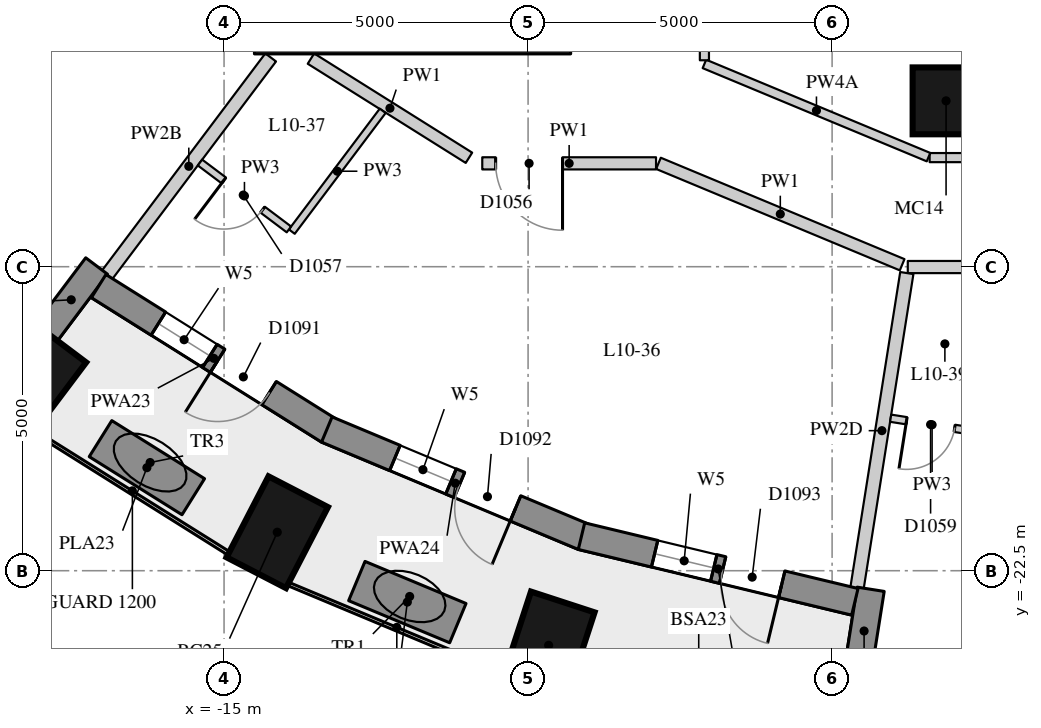
"""IFC4 building model, lengths in metres.
Left out: names, types, materials, properties, quantities, classifications, styles, units other than length and angle.
Written with IfcOpenShell. Run it as: python <this file> out.ifc"""

import sys

from ifc_helpers import new_model, si_unit, direction, frame, frame_2d, origin, origin_2d, place, context, subcontext, project, spatial, rectangle, extrude, element, fill, save


model = new_model("IFC4")
c1 = context("Model", 3, precision=1e-05, world=origin(), true_north=direction((0.0, 1.0)))
c2 = subcontext(c1, "Body", "Model", "MODEL_VIEW")
j1 = project(units=[si_unit("LENGTHUNIT", "METRE"), si_unit("PLANEANGLEUNIT", "RADIAN")], contexts=[c1])
p1 = place(None, origin())
s1 = spatial("IfcSite", under=j1, at=p1, CompositionType="ELEMENT")
p2 = place(p1, origin())
s2 = spatial("IfcBuilding", under=s1, at=p2, CompositionType="ELEMENT")
p3 = place(p2, frame((0.0, 0.0, 41.5)))
s3 = spatial("IfcBuildingStorey", under=s2, at=p3, CompositionType="ELEMENT", Elevation=41.5)
for number, where, z_axis, x_axis in (
    (1, (-18.159, -19.343, 0.0), (0.0, 0.0, 1.0), (-0.601, -0.799, 0.0)),
    (2, (-14.125, -21.867, 0.0), (0.0, 0.0, 1.0), (-0.46, -0.888, 0.0)),
    (3, (-9.662, -23.727, 0.0), (0.0, 0.0, 1.0), (-0.31, -0.951, 0.0)),
):
    element("IfcColumn", number, at=place(p3, frame(where, z_axis=z_axis, x_axis=x_axis)), inside=s3, PredefinedType="COLUMN", context=c2, shape_type="SweptSolid", body=[
        extrude(rectangle(XDim=1.5, YDim=1.1, at=origin_2d()), origin(), (0.0, 0.0, 1.0), 3.3),
    ])
p4 = place(p3, frame((-3.126, -14.772, 0.0), z_axis=(0.0, 0.0, 1.0), x_axis=(1.0, 0.0, 0.0)))
e4 = element("IfcColumn", 4, at=p4, inside=s3, PredefinedType="COLUMN", context=c2, shape_type="SweptSolid", body=[
    extrude(rectangle(XDim=1.1, YDim=1.1, at=origin_2d()), origin(), (0.0, 0.0, 1.0), 3.3),
])
p5 = place(p3, frame((-17.932, -18.6, 0.0), z_axis=(0.0, 0.0, 1.0), x_axis=(0.601262851241, 0.799051302306, 0.0)))
e5 = element("IfcWall", 5, at=p5, inside=s3, PredefinedType="SOLIDWALL", context=c2, shape_type="SweptSolid", body=[
    extrude(rectangle(XDim=1.391, YDim=0.45, at=frame_2d((0.696, 0.0))), origin(), (0.0, 0.0, 1.0), 2.57),
])
p6 = place(p3, frame((-4.583, -24.178, 0.0), z_axis=(0.0, 0.0, 1.0), x_axis=(0.156133927791, 0.98773589415, 0.0)))
e6 = element("IfcWall", 6, at=p6, inside=s3, PredefinedType="SOLIDWALL", context=c2, shape_type="SweptSolid", body=[
    extrude(rectangle(XDim=1.39, YDim=0.45, at=frame_2d((0.695, 0.0))), origin(), (0.0, 0.0, 1.0), 2.47),
])
p7 = place(p3, frame((-17.062, -17.819, 0.0), z_axis=(0.0, 0.0, 1.0), x_axis=(0.846990101364, -0.531608660757, 0.0)))
e7 = element("IfcWall", 7, at=p7, inside=s3, PredefinedType="SOLIDWALL", context=c2, shape_type="SweptSolid", body=[
    extrude(rectangle(XDim=4.469, YDim=0.45, at=frame_2d((2.234, 0.0))), origin(), (0.0, 0.0, 1.0), 3.02),
])
p8 = place(p7, frame((1.159, 0.0, 0.4)))
e8 = element("IfcOpeningElement", 8, at=p8, cuts=e7, PredefinedType="OPENING", context=c2, shape_type="SweptSolid", body=[
    extrude(rectangle(XDim=1.0, YDim=1.75, at=frame_2d((0.5, 0.875))), frame((0.0, 0.235, 0.0), z_axis=(0.0, -1.0, 0.0), x_axis=(1.0, 0.0, 0.0)), (0.0, 0.0, 1.0), 0.47),
])
p9 = place(p7, frame((2.31, 0.0, 0.0)))
e9 = element("IfcOpeningElement", 9, at=p9, cuts=e7, PredefinedType="OPENING", context=c2, shape_type="SweptSolid", body=[
    extrude(rectangle(XDim=1.0, YDim=2.15, at=frame_2d((0.5, 1.075))), frame((0.0, 0.235, 0.0), z_axis=(0.0, -1.0, 0.0), x_axis=(1.0, 0.0, 0.0)), (0.0, 0.0, 1.0), 0.47),
])
p10 = place(p3, frame((-13.31, -20.178, 0.0), z_axis=(0.0, 0.0, 1.0), x_axis=(0.922634412489, -0.385675693935, 0.0)))
e10 = element("IfcWall", 10, at=p10, inside=s3, PredefinedType="SOLIDWALL", context=c2, shape_type="SweptSolid", body=[
    extrude(rectangle(XDim=4.577, YDim=0.45, at=frame_2d((2.288, 0.0))), origin(), (0.0, 0.0, 1.0), 3.02),
])
p11 = place(p10, frame((1.213, 0.0, 0.4)))
e11 = element("IfcOpeningElement", 11, at=p11, cuts=e10, PredefinedType="OPENING", context=c2, shape_type="SweptSolid", body=[
    extrude(rectangle(XDim=1.0, YDim=1.75, at=frame_2d((0.5, 0.875))), frame((0.0, 0.235, 0.0), z_axis=(0.0, -1.0, 0.0), x_axis=(1.0, 0.0, 0.0)), (0.0, 0.0, 1.0), 0.47),
])
p12 = place(p10, frame((2.363, 0.0, 0.0)))
e12 = element("IfcOpeningElement", 12, at=p12, cuts=e10, PredefinedType="OPENING", context=c2, shape_type="SweptSolid", body=[
    extrude(rectangle(XDim=1.0, YDim=2.15, at=frame_2d((0.5, 1.075))), frame((0.0, 0.235, 0.0), z_axis=(0.0, -1.0, 0.0), x_axis=(1.0, 0.0, 0.0)), (0.0, 0.0, 1.0), 0.47),
])
p13 = place(p3, frame((-9.122, -21.932, 0.0), z_axis=(0.0, 0.0, 1.0), x_axis=(0.972346547441, -0.233542697764, 0.0)))
e13 = element("IfcWall", 13, at=p13, inside=s3, PredefinedType="SOLIDWALL", context=c2, shape_type="SweptSolid", body=[
    extrude(rectangle(XDim=4.624, YDim=0.45, at=frame_2d((2.312, 0.0))), origin(), (0.0, 0.0, 1.0), 3.02),
])
p14 = place(p13, frame((1.237, 0.0, 0.4)))
e14 = element("IfcOpeningElement", 14, at=p14, cuts=e13, PredefinedType="OPENING", context=c2, shape_type="SweptSolid", body=[
    extrude(rectangle(XDim=1.0, YDim=1.75, at=frame_2d((0.5, 0.875))), frame((0.0, 0.235, 0.0), z_axis=(0.0, -1.0, 0.0), x_axis=(1.0, 0.0, 0.0)), (0.0, 0.0, 1.0), 0.47),
])
p15 = place(p13, frame((2.387, 0.0, 0.0)))
e15 = element("IfcOpeningElement", 15, at=p15, cuts=e13, PredefinedType="OPENING", context=c2, shape_type="SweptSolid", body=[
    extrude(rectangle(XDim=1.0, YDim=2.15, at=frame_2d((0.5, 1.075))), frame((0.0, 0.235, 0.0), z_axis=(0.0, -1.0, 0.0), x_axis=(1.0, 0.0, 0.0)), (0.0, 0.0, 1.0), 0.47),
])
p16 = place(p3, frame((-17.032, -20.328, 0.0), z_axis=(0.0, 0.0, 1.0), x_axis=(0.847609446823, -0.530620604252, 0.0)))
e16 = element("IfcWall", 16, at=p16, inside=s3, PredefinedType="USERDEFINED", context=c2, shape_type="SweptSolid", body=[
    extrude(rectangle(XDim=1.8, YDim=0.7, at=frame_2d((0.9, 0.0))), origin(), (0.0, 0.0, 1.0), 0.75),
])
p17 = place(p3, frame((-12.817, -22.67, 0.0), z_axis=(0.0, 0.0, 1.0), x_axis=(0.923000660042, -0.384798364811, 0.0)))
e17 = element("IfcWall", 17, at=p17, inside=s3, PredefinedType="USERDEFINED", context=c2, shape_type="SweptSolid", body=[
    extrude(rectangle(XDim=1.8, YDim=0.7, at=frame_2d((0.9, 0.0))), origin(), (0.0, 0.0, 1.0), 0.75),
])
p18 = place(p3, frame((-14.5, -13.875, -0.28), z_axis=(0.0, 0.0, 1.0), x_axis=(1.0, 0.0, 0.0)))
e18 = element("IfcWall", 18, at=p18, inside=s3, PredefinedType="SHEAR", context=c2, shape_type="SweptSolid", body=[
    extrude(rectangle(XDim=5.2, YDim=0.25, at=frame_2d((2.6, 0.0))), origin(), (0.0, 0.0, 1.0), 3.3),
])
p19 = place(p3, frame((3.715, -17.506, 0.0), z_axis=(0.0, 0.0, 1.0), x_axis=(-1.0, 0.0, 0.0)))
e19 = element("IfcWall", 19, at=p19, inside=s3, PredefinedType="PARTITIONING", context=c2, shape_type="SweptSolid", body=[
    extrude(rectangle(XDim=7.471, YDim=0.2, at=frame_2d((3.735, 0.0))), origin(), (0.0, 0.0, 1.0), 3.02),
])
p20 = place(p19, frame((4.538, 0.0, 0.0)))
e20 = element("IfcOpeningElement", 20, at=p20, cuts=e19, PredefinedType="OPENING", context=c2, shape_type="SweptSolid", body=[
    extrude(rectangle(XDim=1.0, YDim=2.1, at=frame_2d((0.5, 1.05))), frame((0.0, 0.11, 0.0), z_axis=(0.0, -1.0, 0.0), x_axis=(1.0, 0.0, 0.0)), (0.0, 0.0, 1.0), 0.22),
])
p21 = place(p19, frame((0.743, 0.0, 0.0)))
e21 = element("IfcOpeningElement", 21, at=p21, cuts=e19, PredefinedType="OPENING", context=c2, shape_type="SweptSolid", body=[
    extrude(rectangle(XDim=1.0, YDim=2.1, at=frame_2d((0.5, 1.05))), frame((0.0, 0.11, 0.0), z_axis=(0.0, -1.0, 0.0), x_axis=(1.0, 0.0, 0.0)), (0.0, 0.0, 1.0), 0.22),
])
p22 = place(p3, frame((-3.848, -17.468, 0.0), z_axis=(0.0, 0.0, 1.0), x_axis=(-0.923248226412, 0.384203998454, 0.0)))
e22 = element("IfcWall", 22, at=p22, inside=s3, PredefinedType="PARTITIONING", context=c2, shape_type="SweptSolid", body=[
    extrude(rectangle(XDim=4.341, YDim=0.2, at=frame_2d((2.17, 0.0))), origin(), (0.0, 0.0, 1.0), 3.02),
])
p23 = place(p3, frame((-7.896, -15.8, 0.0), z_axis=(0.0, 0.0, 1.0), x_axis=(-1.0, 0.0, 0.0)))
e23 = element("IfcWall", 23, at=p23, inside=s3, PredefinedType="PARTITIONING", context=c2, shape_type="SweptSolid", body=[
    extrude(rectangle(XDim=2.858, YDim=0.2, at=frame_2d((1.429, 0.0))), origin(), (0.0, 0.0, 1.0), 3.02),
])
p24 = place(p23, frame((1.538, 0.0, 0.0)))
e24 = element("IfcOpeningElement", 24, at=p24, cuts=e23, PredefinedType="OPENING", context=c2, shape_type="SweptSolid", body=[
    extrude(rectangle(XDim=1.1, YDim=2.1, at=frame_2d((0.55, 1.05))), frame((0.0, 0.11, 0.0), z_axis=(0.0, -1.0, 0.0), x_axis=(1.0, 0.0, 0.0)), (0.0, 0.0, 1.0), 0.22),
])
p25 = place(p3, frame((-10.972, -15.708, 0.0), z_axis=(0.0, 0.0, 1.0), x_axis=(-0.846954991261, 0.53166459613, 0.0)))
e25 = element("IfcWall", 25, at=p25, inside=s3, PredefinedType="PARTITIONING", context=c2, shape_type="SweptSolid", body=[
    extrude(rectangle(XDim=3.068, YDim=0.2, at=frame_2d((1.534, 0.0))), origin(), (0.0, 0.0, 1.0), 3.02),
])
p26 = place(p3, frame((0.92, -15.706, 0.0), z_axis=(0.0, 0.0, 1.0), x_axis=(-1.0, 0.0, 0.0)))
e26 = element("IfcWall", 26, at=p26, inside=s3, PredefinedType="PARTITIONING", context=c2, shape_type="SweptSolid", body=[
    extrude(rectangle(XDim=4.316, YDim=0.15, at=frame_2d((2.158, 0.0))), origin(), (0.0, 0.0, 1.0), 3.02),
])
p27 = place(p3, frame((-3.415, -15.698, 0.0), z_axis=(0.0, 0.0, 1.0), x_axis=(-0.923293917367, 0.38409418396, 0.0)))
e27 = element("IfcWall", 27, at=p27, inside=s3, PredefinedType="PARTITIONING", context=c2, shape_type="SweptSolid", body=[
    extrude(rectangle(XDim=3.992, YDim=0.15, at=frame_2d((1.996, 0.0))), origin(), (0.0, 0.0, 1.0), 2.57),
])
p28 = place(p3, frame((-7.1, -14.105, 0.0), z_axis=(0.0, 0.0, 1.0), x_axis=(0.0, 1.0, 0.0)))
e28 = element("IfcWall", 28, at=p28, inside=s3, PredefinedType="PARTITIONING", context=c2, shape_type="SweptSolid", body=[
    extrude(rectangle(XDim=2.355, YDim=0.15, at=frame_2d((1.177, 0.0))), origin(), (0.0, 0.0, 1.0), 3.02),
])
p29 = place(p3, frame((-16.927, -17.638, 0.0), z_axis=(0.0, 0.0, 1.0), x_axis=(0.601158965663, 0.799129462605, 0.0)))
e29 = element("IfcWall", 29, at=p29, inside=s3, PredefinedType="PARTITIONING", context=c2, shape_type="SweptSolid", body=[
    extrude(rectangle(XDim=4.48, YDim=0.22, at=frame_2d((2.24, 0.0))), origin(), (0.0, 0.0, 1.0), 2.57),
])
p30 = place(p3, frame((-4.591, -22.789, 0.0), z_axis=(0.0, 0.0, 1.0), x_axis=(0.156110671429, 0.987739570062, 0.0)))
e30 = element("IfcWall", 30, at=p30, inside=s3, PredefinedType="PARTITIONING", context=c2, shape_type="SweptSolid", body=[
    extrude(rectangle(XDim=5.249, YDim=0.22, at=frame_2d((2.624, 0.0))), origin(), (0.0, 0.0, 1.0), 2.47),
])
p31 = place(p3, frame((-12.391, -14.936, 0.0), z_axis=(0.0, 0.0, 1.0), x_axis=(-0.601209195786, -0.799091673654, 0.0)))
e31 = element("IfcWall", 31, at=p31, inside=s3, PredefinedType="PARTITIONING", context=c2, shape_type="SweptSolid", body=[
    extrude(rectangle(XDim=2.486, YDim=0.12, at=frame_2d((1.243, 0.0))), origin(), (0.0, 0.0, 1.0), 3.02),
])
p32 = place(p3, frame((-13.933, -16.887, 0.0), z_axis=(0.0, 0.0, 1.0), x_axis=(-0.799134663307, 0.601152052231, 0.0)))
e32 = element("IfcWall", 32, at=p32, inside=s3, PredefinedType="PARTITIONING", context=c2, shape_type="SweptSolid", body=[
    extrude(rectangle(XDim=1.83, YDim=0.12, at=frame_2d((0.915, 0.0))), origin(), (0.0, 0.0, 1.0), 3.02),
])
p33 = place(p32, frame((0.54, 0.0, 0.0)))
e33 = element("IfcOpeningElement", 33, at=p33, cuts=e32, PredefinedType="OPENING", context=c2, shape_type="SweptSolid", body=[
    extrude(rectangle(XDim=0.8, YDim=2.1, at=frame_2d((0.4, 1.05))), frame((0.0, 0.07, 0.0), z_axis=(0.0, -1.0, 0.0), x_axis=(1.0, 0.0, 0.0)), (0.0, 0.0, 1.0), 0.14),
])
p34 = place(p3, frame((-2.674, -20.208, 0.0), z_axis=(0.0, 0.0, 1.0), x_axis=(-0.987695455518, 0.156389536571, 0.0)))
e34 = element("IfcWall", 34, at=p34, inside=s3, PredefinedType="PARTITIONING", context=c2, shape_type="SweptSolid", body=[
    extrude(rectangle(XDim=1.38, YDim=0.12, at=frame_2d((0.69, 0.0))), origin(), (0.0, 0.0, 1.0), 3.02),
])
p35 = place(p34, frame((0.315, 0.0, 0.0)))
e35 = element("IfcOpeningElement", 35, at=p35, cuts=e34, PredefinedType="OPENING", context=c2, shape_type="SweptSolid", body=[
    extrude(rectangle(XDim=0.8, YDim=2.1, at=frame_2d((0.4, 1.05))), frame((0.0, 0.07, 0.0), z_axis=(0.0, -1.0, 0.0), x_axis=(1.0, 0.0, 0.0)), (0.0, 0.0, 1.0), 0.14),
])
p36 = place(p8, origin())
e36 = element("IfcWindow", 36, at=p36, inside=s3, PartitioningType="SINGLE_PANEL", PredefinedType="WINDOW", context=c2, shape_type="SweptSolid", body=[
    extrude(rectangle(XDim=1.0, YDim=1.75, at=frame_2d((0.5, 0.875))), frame((0.0, 0.035, 0.0), z_axis=(0.0, -1.0, 0.0), x_axis=(1.0, 0.0, 0.0)), (0.0, 0.0, 1.0), 0.06),
])
fill(e8, e36)
p37 = place(p9, frame((1.0, 0.0, 0.0), z_axis=(0.0, 0.0, 1.0), x_axis=(-1.0, 0.0, 0.0)))
e37 = element("IfcDoor", 37, at=p37, inside=s3, OperationType="SINGLE_SWING_RIGHT", PredefinedType="DOOR", context=c2, shape_type="SweptSolid", body=[
    extrude(rectangle(XDim=1.0, YDim=2.15, at=frame_2d((0.5, 1.075))), frame((0.0, 0.075, 0.0), z_axis=(0.0, -1.0, 0.0), x_axis=(1.0, 0.0, 0.0)), (0.0, 0.0, 1.0), 0.05),
])
fill(e9, e37)
p38 = place(p11, origin())
e38 = element("IfcWindow", 38, at=p38, inside=s3, PartitioningType="SINGLE_PANEL", PredefinedType="WINDOW", context=c2, shape_type="SweptSolid", body=[
    extrude(rectangle(XDim=1.0, YDim=1.75, at=frame_2d((0.5, 0.875))), frame((0.0, 0.035, 0.0), z_axis=(0.0, -1.0, 0.0), x_axis=(1.0, 0.0, 0.0)), (0.0, 0.0, 1.0), 0.06),
])
fill(e11, e38)
p39 = place(p12, frame((1.0, 0.0, 0.0), z_axis=(0.0, 0.0, 1.0), x_axis=(-1.0, 0.0, 0.0)))
e39 = element("IfcDoor", 39, at=p39, inside=s3, OperationType="SINGLE_SWING_LEFT", PredefinedType="DOOR", context=c2, shape_type="SweptSolid", body=[
    extrude(rectangle(XDim=1.0, YDim=2.15, at=frame_2d((0.5, 1.075))), frame((0.0, 0.075, 0.0), z_axis=(0.0, -1.0, 0.0), x_axis=(1.0, 0.0, 0.0)), (0.0, 0.0, 1.0), 0.05),
])
fill(e12, e39)
p40 = place(p14, origin())
e40 = element("IfcWindow", 40, at=p40, inside=s3, PartitioningType="SINGLE_PANEL", PredefinedType="WINDOW", context=c2, shape_type="SweptSolid", body=[
    extrude(rectangle(XDim=1.0, YDim=1.75, at=frame_2d((0.5, 0.875))), frame((0.0, 0.035, 0.0), z_axis=(0.0, -1.0, 0.0), x_axis=(1.0, 0.0, 0.0)), (0.0, 0.0, 1.0), 0.06),
])
fill(e14, e40)
p41 = place(p15, frame((1.0, 0.0, 0.0), z_axis=(0.0, 0.0, 1.0), x_axis=(-1.0, 0.0, 0.0)))
e41 = element("IfcDoor", 41, at=p41, inside=s3, OperationType="SINGLE_SWING_LEFT", PredefinedType="DOOR", context=c2, shape_type="SweptSolid", body=[
    extrude(rectangle(XDim=1.0, YDim=2.15, at=frame_2d((0.5, 1.075))), frame((0.0, 0.075, 0.0), z_axis=(0.0, -1.0, 0.0), x_axis=(1.0, 0.0, 0.0)), (0.0, 0.0, 1.0), 0.05),
])
fill(e15, e41)
p42 = place(p24, origin())
e42 = element("IfcDoor", 42, at=p42, inside=s3, OperationType="SINGLE_SWING_LEFT", PredefinedType="DOOR", context=c2, shape_type="SweptSolid", body=[
    extrude(rectangle(XDim=1.1, YDim=2.1, at=frame_2d((0.55, 1.05))), frame((0.0, 0.025, 0.0), z_axis=(0.0, -1.0, 0.0), x_axis=(1.0, 0.0, 0.0)), (0.0, 0.0, 1.0), 0.05),
])
fill(e24, e42)
p43 = place(p33, origin())
e43 = element("IfcDoor", 43, at=p43, inside=s3, OperationType="SINGLE_SWING_RIGHT", PredefinedType="DOOR", context=c2, shape_type="SweptSolid", body=[
    extrude(rectangle(XDim=0.8, YDim=2.1, at=frame_2d((0.4, 1.05))), frame((0.0, 0.025, 0.0), z_axis=(0.0, -1.0, 0.0), x_axis=(1.0, 0.0, 0.0)), (0.0, 0.0, 1.0), 0.05),
])
fill(e33, e43)
p44 = place(p35, origin())
e44 = element("IfcDoor", 44, at=p44, inside=s3, OperationType="SINGLE_SWING_RIGHT", PredefinedType="DOOR", context=c2, shape_type="SweptSolid", body=[
    extrude(rectangle(XDim=0.8, YDim=2.1, at=frame_2d((0.4, 1.05))), frame((0.0, 0.025, 0.0), z_axis=(0.0, -1.0, 0.0), x_axis=(1.0, 0.0, 0.0)), (0.0, 0.0, 1.0), 0.05),
])
fill(e35, e44)
save(model, sys.argv[1])
